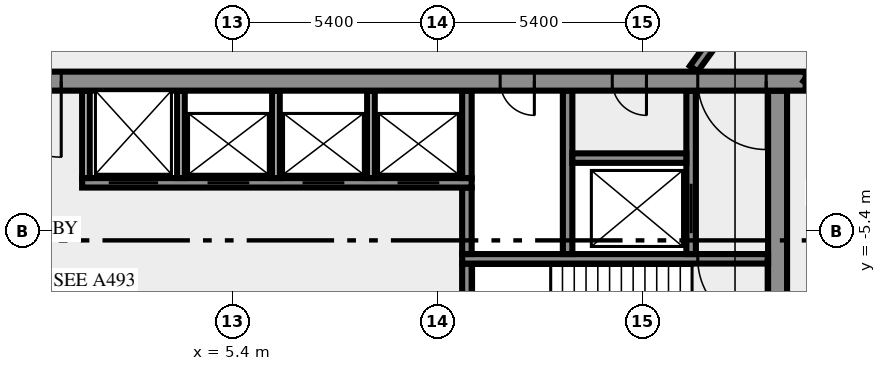
"""IFC4 building model, lengths in metres.
Left out: names, types, materials, properties, quantities, classifications, styles, units other than length and angle.
Written with IfcOpenShell. Run it as: python <this file> out.ifc"""

import sys

from ifc_helpers import new_model, si_unit, direction, frame, frame_2d, origin, place, context, subcontext, project, spatial, rectangle, extrude, element, fill, save


model = new_model("IFC4")
c1 = context("Model", 3, precision=1e-05, world=origin(), true_north=direction((0.0, 1.0)))
c2 = subcontext(c1, "Body", "Model", "MODEL_VIEW")
j1 = project(units=[si_unit("LENGTHUNIT", "METRE"), si_unit("PLANEANGLEUNIT", "RADIAN")], contexts=[c1])
p1 = place(None, origin())
s1 = spatial("IfcSite", under=j1, at=p1, CompositionType="ELEMENT")
p2 = place(p1, origin())
s2 = spatial("IfcBuilding", under=s1, at=p2, CompositionType="ELEMENT")
p3 = place(p2, frame((0.0, 0.0, 206.0)))
s3 = spatial("IfcBuildingStorey", under=s2, at=p3, CompositionType="ELEMENT", Elevation=206.0)
p4 = place(p3, frame((19.75, -10.5, 0.0), z_axis=(0.0, 0.0, 1.0), x_axis=(0.0, 1.0, 0.0)))
e1 = element("IfcWall", 1, at=p4, inside=s3, PredefinedType="SHEAR", context=c2, shape_type="SweptSolid", body=[
    extrude(rectangle(XDim=8.8, YDim=0.5, at=frame_2d((4.4, 0.0))), origin(), (0.0, 0.0, 1.0), 3.65),
])
p5 = place(p3, frame((11.575, -7.25, 0.0), z_axis=(0.0, 0.0, 1.0), x_axis=(0.0, 1.0, 0.0)))
e2 = element("IfcWall", 2, at=p5, inside=s3, PredefinedType="SHEAR", context=c2, shape_type="SweptSolid", body=[
    extrude(rectangle(XDim=1.0, YDim=0.25, at=frame_2d((0.5, 0.0))), origin(), (0.0, 0.0, 1.0), 3.65),
])
p6 = place(p3, frame((19.5, -6.125, 0.0), z_axis=(0.0, 0.0, 1.0), x_axis=(-1.0, 0.0, 0.0)))
e3 = element("IfcWall", 3, at=p6, inside=s3, PredefinedType="SHEAR", context=c2, shape_type="SweptSolid", body=[
    extrude(rectangle(XDim=8.05, YDim=0.25, at=frame_2d((4.025, 0.0))), origin(), (0.0, 0.0, 1.0), 3.65),
])
p7 = place(p6, frame((0.05, 0.0, 0.0)))
e4 = element("IfcOpeningElement", 4, at=p7, cuts=e3, PredefinedType="OPENING", context=c2, shape_type="SweptSolid", body=[
    extrude(rectangle(XDim=1.8, YDim=2.1, at=frame_2d((0.9, 1.05))), frame((0.0, 0.135, 0.0), z_axis=(0.0, -1.0, 0.0), x_axis=(1.0, 0.0, 0.0)), (0.0, 0.0, 1.0), 0.27),
])
p8 = place(p3, frame((11.575, -6.0, 0.0), z_axis=(0.0, 0.0, 1.0), x_axis=(0.0, 1.0, 0.0)))
e5 = element("IfcWall", 5, at=p8, inside=s3, PredefinedType="SHEAR", context=c2, shape_type="SweptSolid", body=[
    extrude(rectangle(XDim=1.75, YDim=0.25, at=frame_2d((0.875, 0.0))), origin(), (0.0, 0.0, 1.0), 3.65),
])
p9 = place(p3, frame((14.225, -6.0, 0.0), z_axis=(0.0, 0.0, 1.0), x_axis=(0.0, 1.0, 0.0)))
e6 = element("IfcWall", 6, at=p9, inside=s3, PredefinedType="SHEAR", context=c2, shape_type="SweptSolid", body=[
    extrude(rectangle(XDim=4.3, YDim=0.25, at=frame_2d((2.15, 0.0))), origin(), (0.0, 0.0, 1.0), 3.65),
])
p10 = place(p3, frame((17.475, -6.0, 0.0), z_axis=(0.0, 0.0, 1.0), x_axis=(0.0, 1.0, 0.0)))
e7 = element("IfcWall", 7, at=p10, inside=s3, PredefinedType="SHEAR", context=c2, shape_type="SweptSolid", body=[
    extrude(rectangle(XDim=4.3, YDim=0.25, at=frame_2d((2.15, 0.0))), origin(), (0.0, 0.0, 1.0), 3.65),
])
p11 = place(p10, frame((0.55, 0.0, 0.0)))
e8 = element("IfcOpeningElement", 8, at=p11, cuts=e7, PredefinedType="OPENING", context=c2, shape_type="SweptSolid", body=[
    extrude(rectangle(XDim=1.3, YDim=2.1, at=frame_2d((0.65, 1.05))), frame((0.0, 0.135, 0.0), z_axis=(0.0, -1.0, 0.0), x_axis=(1.0, 0.0, 0.0)), (0.0, 0.0, 1.0), 0.27),
])
p12 = place(p3, frame((1.45, -4.125, 0.0), z_axis=(0.0, 0.0, 1.0), x_axis=(1.0, 0.0, 0.0)))
e9 = element("IfcWall", 9, at=p12, inside=s3, PredefinedType="SHEAR", context=c2, shape_type="SweptSolid", body=[
    extrude(rectangle(XDim=10.25, YDim=0.25, at=frame_2d((5.125, 0.0))), origin(), (0.0, 0.0, 1.0), 3.65),
])
p13 = place(p12, frame((0.7, 0.0, 0.0)))
e10 = element("IfcOpeningElement", 10, at=p13, cuts=e9, PredefinedType="OPENING", context=c2, shape_type="SweptSolid", body=[
    extrude(rectangle(XDim=1.3, YDim=2.1, at=frame_2d((0.65, 1.05))), frame((0.0, 0.135, 0.0), z_axis=(0.0, -1.0, 0.0), x_axis=(1.0, 0.0, 0.0)), (0.0, 0.0, 1.0), 0.27),
])
p14 = place(p12, frame((3.3, 0.0, 0.0)))
e11 = element("IfcOpeningElement", 11, at=p14, cuts=e9, PredefinedType="OPENING", context=c2, shape_type="SweptSolid", body=[
    extrude(rectangle(XDim=1.1, YDim=2.1, at=frame_2d((0.55, 1.05))), frame((0.0, 0.135, 0.0), z_axis=(0.0, -1.0, 0.0), x_axis=(1.0, 0.0, 0.0)), (0.0, 0.0, 1.0), 0.27),
])
p15 = place(p12, frame((5.8, 0.0, 0.0)))
e12 = element("IfcOpeningElement", 12, at=p15, cuts=e9, PredefinedType="OPENING", context=c2, shape_type="SweptSolid", body=[
    extrude(rectangle(XDim=1.1, YDim=2.1, at=frame_2d((0.55, 1.05))), frame((0.0, 0.135, 0.0), z_axis=(0.0, -1.0, 0.0), x_axis=(1.0, 0.0, 0.0)), (0.0, 0.0, 1.0), 0.27),
])
p16 = place(p12, frame((8.3, 0.0, 0.0)))
e13 = element("IfcOpeningElement", 13, at=p16, cuts=e9, PredefinedType="OPENING", context=c2, shape_type="SweptSolid", body=[
    extrude(rectangle(XDim=1.1, YDim=2.1, at=frame_2d((0.55, 1.05))), frame((0.0, 0.135, 0.0), z_axis=(0.0, -1.0, 0.0), x_axis=(1.0, 0.0, 0.0)), (0.0, 0.0, 1.0), 0.27),
])
for number, where, z_axis, x_axis in (
    (14, (1.55, -4.0, 0.0), (0.0, 0.0, 1.0), (0.0, 1.0, 0.0)),
    (15, (4.05, -4.0, 0.0), (0.0, 0.0, 1.0), (0.0, 1.0, 0.0)),
    (16, (6.55, -4.0, 0.0), (0.0, 0.0, 1.0), (0.0, 1.0, 0.0)),
    (17, (9.05, -4.0, 0.0), (0.0, 0.0, 1.0), (0.0, 1.0, 0.0)),
):
    element("IfcWall", number, at=place(p3, frame(where, z_axis=z_axis, x_axis=x_axis)), inside=s3, PredefinedType="SOLIDWALL", context=c2, shape_type="SweptSolid", body=[
        extrude(rectangle(XDim=2.3, YDim=0.2, at=frame_2d((1.15, 0.0))), origin(), (0.0, 0.0, 1.0), 3.65),
    ])
p17 = place(p3, frame((11.575, -4.0, 0.0), z_axis=(0.0, 0.0, 1.0), x_axis=(0.0, 1.0, 0.0)))
e18 = element("IfcWall", 18, at=p17, inside=s3, PredefinedType="SHEAR", context=c2, shape_type="SweptSolid", body=[
    extrude(rectangle(XDim=2.3, YDim=0.25, at=frame_2d((1.15, 0.0))), origin(), (0.0, 0.0, 1.0), 3.65),
])
p18 = place(p3, frame((14.35, -3.475, 0.0), z_axis=(0.0, 0.0, 1.0), x_axis=(1.0, 0.0, 0.0)))
e19 = element("IfcWall", 19, at=p18, inside=s3, PredefinedType="SHEAR", context=c2, shape_type="SweptSolid", body=[
    extrude(rectangle(XDim=3.0, YDim=0.25, at=frame_2d((1.5, 0.0))), origin(), (0.0, 0.0, 1.0), 3.65),
])
p19 = place(p3, frame((20.49, -1.45, 0.0), z_axis=(0.0, 0.0, 1.0), x_axis=(-1.0, 0.0, 0.0)))
e20 = element("IfcWall", 20, at=p19, inside=s3, PredefinedType="SHEAR", context=c2, shape_type="SweptSolid", body=[
    extrude(rectangle(XDim=40.98, YDim=0.5, at=frame_2d((20.49, 0.0))), origin(), (0.0, 0.0, 1.0), 3.65),
])
p20 = place(p19, frame((38.14, 0.0, 0.0)))
e21 = element("IfcOpeningElement", 21, at=p20, cuts=e20, PredefinedType="OPENING", context=c2, shape_type="SweptSolid", body=[
    extrude(rectangle(XDim=1.8, YDim=2.1, at=frame_2d((0.9, 1.05))), frame((0.0, 0.26, 0.0), z_axis=(0.0, -1.0, 0.0), x_axis=(1.0, 0.0, 0.0)), (0.0, 0.0, 1.0), 0.52),
])
p21 = place(p19, frame((36.728, 0.0, 0.0)))
e22 = element("IfcOpeningElement", 22, at=p21, cuts=e20, PredefinedType="OPENING", context=c2, shape_type="SweptSolid", body=[
    extrude(rectangle(XDim=0.8, YDim=2.1, at=frame_2d((0.4, 1.05))), frame((0.0, 0.26, 0.0), z_axis=(0.0, -1.0, 0.0), x_axis=(1.0, 0.0, 0.0)), (0.0, 0.0, 1.0), 0.52),
])
p22 = place(p19, frame((35.153, 0.0, 0.0)))
e23 = element("IfcOpeningElement", 23, at=p22, cuts=e20, PredefinedType="OPENING", context=c2, shape_type="SweptSolid", body=[
    extrude(rectangle(XDim=0.8, YDim=2.1, at=frame_2d((0.4, 1.05))), frame((0.0, 0.26, 0.0), z_axis=(0.0, -1.0, 0.0), x_axis=(1.0, 0.0, 0.0)), (0.0, 0.0, 1.0), 0.52),
])
p23 = place(p19, frame((32.94, 0.0, 0.0)))
e24 = element("IfcOpeningElement", 24, at=p23, cuts=e20, PredefinedType="OPENING", context=c2, shape_type="SweptSolid", body=[
    extrude(rectangle(XDim=0.9, YDim=2.1, at=frame_2d((0.45, 1.05))), frame((0.0, 0.26, 0.0), z_axis=(0.0, -1.0, 0.0), x_axis=(1.0, 0.0, 0.0)), (0.0, 0.0, 1.0), 0.52),
])
p24 = place(p19, frame((30.702, 0.0, 0.0)))
e25 = element("IfcOpeningElement", 25, at=p24, cuts=e20, PredefinedType="OPENING", context=c2, shape_type="SweptSolid", body=[
    extrude(rectangle(XDim=0.9, YDim=2.1, at=frame_2d((0.45, 1.05))), frame((0.0, 0.26, 0.0), z_axis=(0.0, -1.0, 0.0), x_axis=(1.0, 0.0, 0.0)), (0.0, 0.0, 1.0), 0.52),
])
p25 = place(p19, frame((28.64, 0.0, 0.0)))
e26 = element("IfcOpeningElement", 26, at=p25, cuts=e20, PredefinedType="OPENING", context=c2, shape_type="SweptSolid", body=[
    extrude(rectangle(XDim=0.9, YDim=2.1, at=frame_2d((0.45, 1.05))), frame((0.0, 0.26, 0.0), z_axis=(0.0, -1.0, 0.0), x_axis=(1.0, 0.0, 0.0)), (0.0, 0.0, 1.0), 0.52),
])
p26 = place(p19, frame((25.778, 0.0, 0.0)))
e27 = element("IfcOpeningElement", 27, at=p26, cuts=e20, PredefinedType="OPENING", context=c2, shape_type="SweptSolid", body=[
    extrude(rectangle(XDim=0.9, YDim=2.1, at=frame_2d((0.45, 1.05))), frame((0.0, 0.26, 0.0), z_axis=(0.0, -1.0, 0.0), x_axis=(1.0, 0.0, 0.0)), (0.0, 0.0, 1.0), 0.52),
])
p27 = place(p19, frame((19.59, 0.0, 0.0)))
e28 = element("IfcOpeningElement", 28, at=p27, cuts=e20, PredefinedType="OPENING", context=c2, shape_type="SweptSolid", body=[
    extrude(rectangle(XDim=2.0, YDim=2.1, at=frame_2d((1.0, 1.05))), frame((0.0, 0.26, 0.0), z_axis=(0.0, -1.0, 0.0), x_axis=(1.0, 0.0, 0.0)), (0.0, 0.0, 1.0), 0.52),
])
p28 = place(p19, frame((7.14, 0.0, 0.0)))
e29 = element("IfcOpeningElement", 29, at=p28, cuts=e20, PredefinedType="OPENING", context=c2, shape_type="SweptSolid", body=[
    extrude(rectangle(XDim=0.9, YDim=2.1, at=frame_2d((0.45, 1.05))), frame((0.0, 0.26, 0.0), z_axis=(0.0, -1.0, 0.0), x_axis=(1.0, 0.0, 0.0)), (0.0, 0.0, 1.0), 0.52),
])
p29 = place(p19, frame((4.19, 0.0, 0.0)))
e30 = element("IfcOpeningElement", 30, at=p29, cuts=e20, PredefinedType="OPENING", context=c2, shape_type="SweptSolid", body=[
    extrude(rectangle(XDim=0.9, YDim=2.1, at=frame_2d((0.45, 1.05))), frame((0.0, 0.26, 0.0), z_axis=(0.0, -1.0, 0.0), x_axis=(1.0, 0.0, 0.0)), (0.0, 0.0, 1.0), 0.52),
])
p30 = place(p19, frame((1.04, 0.0, 0.0)))
e31 = element("IfcOpeningElement", 31, at=p30, cuts=e20, PredefinedType="OPENING", context=c2, shape_type="SweptSolid", body=[
    extrude(rectangle(XDim=1.8, YDim=2.1, at=frame_2d((0.9, 1.05))), frame((0.0, 0.26, 0.0), z_axis=(0.0, -1.0, 0.0), x_axis=(1.0, 0.0, 0.0)), (0.0, 0.0, 1.0), 0.52),
])
p31 = place(p3, frame((17.545, -1.125, 0.0), z_axis=(0.0, 0.0, 1.0), x_axis=(0.58779555165, 0.809009511354, 0.0)))
e32 = element("IfcWall", 32, at=p31, inside=s3, PredefinedType="SOLIDWALL", context=c2, shape_type="SweptSolid", body=[
    extrude(rectangle(XDim=18.103, YDim=0.25, at=frame_2d((9.052, 0.0))), origin(), (0.0, 0.0, 1.0), 3.65),
])
p32 = place(p31, frame((16.728, 0.0, 0.0)))
e33 = element("IfcOpeningElement", 33, at=p32, cuts=e32, PredefinedType="OPENING", context=c2, shape_type="SweptSolid", body=[
    extrude(rectangle(XDim=0.9, YDim=2.1, at=frame_2d((0.45, 1.05))), frame((0.0, 0.135, 0.0), z_axis=(0.0, -1.0, 0.0), x_axis=(1.0, 0.0, 0.0)), (0.0, 0.0, 1.0), 0.27),
])
p33 = place(p3, frame((30.183, 11.761, 0.0), z_axis=(0.0, 0.0, 1.0), x_axis=(-0.587781762867, -0.80901952958, 0.0)))
e34 = element("IfcWall", 34, at=p33, inside=s3, PredefinedType="SOLIDWALL", context=c2, shape_type="SweptSolid", body=[
    extrude(rectangle(XDim=16.42, YDim=0.25, at=frame_2d((8.21, 0.0))), origin(), (0.0, 0.0, 1.0), 3.65),
])
p34 = place(p33, frame((14.988, 0.0, 0.0)))
e35 = element("IfcOpeningElement", 35, at=p34, cuts=e34, PredefinedType="OPENING", context=c2, shape_type="SweptSolid", body=[
    extrude(rectangle(XDim=0.9, YDim=2.1, at=frame_2d((0.45, 1.05))), frame((0.0, 0.135, 0.0), z_axis=(0.0, -1.0, 0.0), x_axis=(1.0, 0.0, 0.0)), (0.0, 0.0, 1.0), 0.27),
])
p35 = place(p33, frame((0.225, 0.0, 0.0)))
e36 = element("IfcOpeningElement", 36, at=p35, cuts=e34, PredefinedType="OPENING", context=c2, shape_type="SweptSolid", body=[
    extrude(rectangle(XDim=0.9, YDim=2.1, at=frame_2d((0.45, 1.05))), frame((0.0, 0.135, 0.0), z_axis=(0.0, -1.0, 0.0), x_axis=(1.0, 0.0, 0.0)), (0.0, 0.0, 1.0), 0.27),
])
p36 = place(p7, origin())
e37 = element("IfcDoor", 37, at=p36, inside=s3, OperationType="DOUBLE_DOOR_SINGLE_SWING", PredefinedType="DOOR", context=c2, shape_type="SweptSolid", body=[
    extrude(rectangle(XDim=1.8, YDim=2.1, at=frame_2d((0.9, 1.05))), frame((0.0, 0.025, 0.0), z_axis=(0.0, -1.0, 0.0), x_axis=(1.0, 0.0, 0.0)), (0.0, 0.0, 1.0), 0.05),
])
fill(e4, e37)
p37 = place(p11, origin())
e38 = element("IfcDoor", 38, at=p37, inside=s3, OperationType="DOUBLE_DOOR_SLIDING", PredefinedType="DOOR", context=c2, shape_type="SweptSolid", body=[
    extrude(rectangle(XDim=1.3, YDim=2.1, at=frame_2d((0.65, 1.05))), frame((0.0, 0.025, 0.0), z_axis=(0.0, -1.0, 0.0), x_axis=(1.0, 0.0, 0.0)), (0.0, 0.0, 1.0), 0.05),
])
fill(e8, e38)
p38 = place(p13, origin())
e39 = element("IfcDoor", 39, at=p38, inside=s3, OperationType="DOUBLE_DOOR_SLIDING", PredefinedType="DOOR", context=c2, shape_type="SweptSolid", body=[
    extrude(rectangle(XDim=1.3, YDim=2.1, at=frame_2d((0.65, 1.05))), frame((0.0, 0.025, 0.0), z_axis=(0.0, -1.0, 0.0), x_axis=(1.0, 0.0, 0.0)), (0.0, 0.0, 1.0), 0.05),
])
fill(e10, e39)
p39 = place(p14, origin())
e40 = element("IfcDoor", 40, at=p39, inside=s3, OperationType="DOUBLE_DOOR_SLIDING", PredefinedType="DOOR", context=c2, shape_type="SweptSolid", body=[
    extrude(rectangle(XDim=1.1, YDim=2.1, at=frame_2d((0.55, 1.05))), frame((0.0, 0.025, 0.0), z_axis=(0.0, -1.0, 0.0), x_axis=(1.0, 0.0, 0.0)), (0.0, 0.0, 1.0), 0.05),
])
fill(e11, e40)
p40 = place(p15, origin())
e41 = element("IfcDoor", 41, at=p40, inside=s3, OperationType="DOUBLE_DOOR_SLIDING", PredefinedType="DOOR", context=c2, shape_type="SweptSolid", body=[
    extrude(rectangle(XDim=1.1, YDim=2.1, at=frame_2d((0.55, 1.05))), frame((0.0, 0.025, 0.0), z_axis=(0.0, -1.0, 0.0), x_axis=(1.0, 0.0, 0.0)), (0.0, 0.0, 1.0), 0.05),
])
fill(e12, e41)
p41 = place(p16, origin())
e42 = element("IfcDoor", 42, at=p41, inside=s3, OperationType="DOUBLE_DOOR_SLIDING", PredefinedType="DOOR", context=c2, shape_type="SweptSolid", body=[
    extrude(rectangle(XDim=1.1, YDim=2.1, at=frame_2d((0.55, 1.05))), frame((0.0, 0.025, 0.0), z_axis=(0.0, -1.0, 0.0), x_axis=(1.0, 0.0, 0.0)), (0.0, 0.0, 1.0), 0.05),
])
fill(e13, e42)
p42 = place(p27, origin())
e43 = element("IfcDoor", 43, at=p42, inside=s3, OperationType="DOUBLE_DOOR_SINGLE_SWING", PredefinedType="DOOR", context=c2, shape_type="SweptSolid", body=[
    extrude(rectangle(XDim=2.0, YDim=2.1, at=frame_2d((1.0, 1.05))), frame((0.0, 0.025, 0.0), z_axis=(0.0, -1.0, 0.0), x_axis=(1.0, 0.0, 0.0)), (0.0, 0.0, 1.0), 0.05),
])
fill(e28, e43)
p43 = place(p28, origin())
e44 = element("IfcDoor", 44, at=p43, inside=s3, OperationType="SINGLE_SWING_LEFT", PredefinedType="DOOR", context=c2, shape_type="SweptSolid", body=[
    extrude(rectangle(XDim=0.9, YDim=2.1, at=frame_2d((0.45, 1.05))), frame((0.0, 0.025, 0.0), z_axis=(0.0, -1.0, 0.0), x_axis=(1.0, 0.0, 0.0)), (0.0, 0.0, 1.0), 0.05),
])
fill(e29, e44)
p44 = place(p29, origin())
e45 = element("IfcDoor", 45, at=p44, inside=s3, OperationType="SINGLE_SWING_LEFT", PredefinedType="DOOR", context=c2, shape_type="SweptSolid", body=[
    extrude(rectangle(XDim=0.9, YDim=2.1, at=frame_2d((0.45, 1.05))), frame((0.0, 0.025, 0.0), z_axis=(0.0, -1.0, 0.0), x_axis=(1.0, 0.0, 0.0)), (0.0, 0.0, 1.0), 0.05),
])
fill(e30, e45)
p45 = place(p30, origin())
e46 = element("IfcDoor", 46, at=p45, inside=s3, OperationType="DOUBLE_DOOR_SINGLE_SWING", PredefinedType="DOOR", context=c2, shape_type="SweptSolid", body=[
    extrude(rectangle(XDim=1.8, YDim=2.1, at=frame_2d((0.9, 1.05))), frame((0.0, 0.025, 0.0), z_axis=(0.0, -1.0, 0.0), x_axis=(1.0, 0.0, 0.0)), (0.0, 0.0, 1.0), 0.05),
])
fill(e31, e46)
save(model, sys.argv[1])
